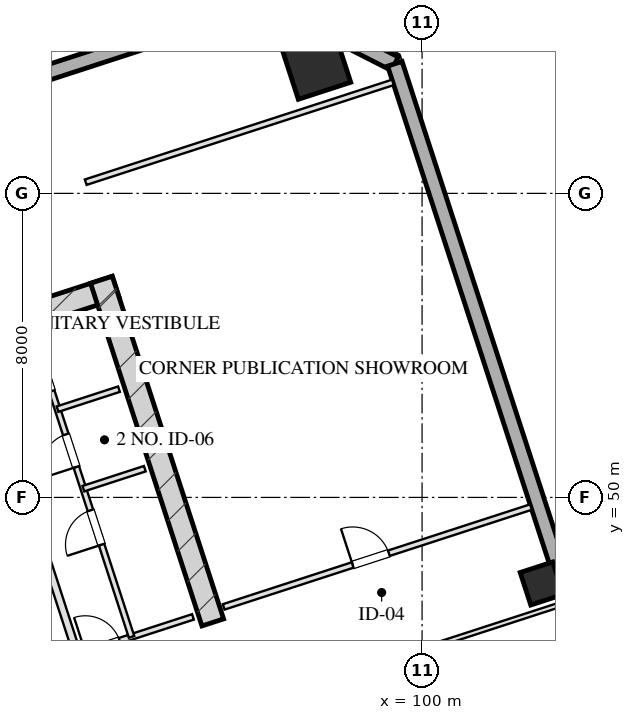
"""IFC4 building model, lengths in metres.
Left out: names, types, materials, properties, quantities, classifications, styles, units other than length and angle.
Written with IfcOpenShell. Run it as: python <this file> out.ifc"""

import sys

from ifc_helpers import new_model, si_unit, direction, frame, frame_2d, origin, origin_2d, place, context, subcontext, project, spatial, rectangle, hollow_rectangle, extrude, element, fill, save


model = new_model("IFC4")
c1 = context("Model", 3, precision=1e-05, world=origin(), true_north=direction((0.0, 1.0)))
c2 = subcontext(c1, "Body", "Model", "MODEL_VIEW")
j1 = project(units=[si_unit("LENGTHUNIT", "METRE"), si_unit("PLANEANGLEUNIT", "RADIAN")], contexts=[c1])
p1 = place(None, origin())
s1 = spatial("IfcSite", under=j1, at=p1, CompositionType="ELEMENT")
p2 = place(p1, origin())
s2 = spatial("IfcBuilding", under=s1, at=p2, CompositionType="ELEMENT")
p3 = place(p2, frame((0.0, 0.0, 117.3)))
s3 = spatial("IfcBuildingStorey", under=s2, at=p3, CompositionType="ELEMENT", Elevation=117.3)
p4 = place(p3, frame((76.344, 50.466, 0.0), z_axis=(0.0, 0.0, 1.0), x_axis=(0.951055727519, 0.309019421968, 0.0)))
e1 = element("IfcWall", 1, at=p4, inside=s3, PredefinedType="SHEAR", context=c2, shape_type="SweptSolid", body=[
    extrude(rectangle(XDim=16.4, YDim=0.6, at=frame_2d((8.2, 0.0))), origin(), (0.0, 0.0, 1.0), 3.45),
])
p5 = place(p3, frame((94.492, 46.71, 0.0), z_axis=(0.0, 0.0, 1.0), x_axis=(-0.309010370028, 0.95105866865, 0.0)))
e2 = element("IfcWall", 2, at=p5, inside=s3, PredefinedType="SHEAR", context=c2, shape_type="SweptSolid", body=[
    extrude(rectangle(XDim=9.48, YDim=0.6, at=frame_2d((4.74, 0.0))), origin(), (0.0, 0.0, 1.0), 3.45),
])
p6 = place(p3, frame((97.209, 61.388, 0.0), z_axis=(0.0, 0.0, 1.0), x_axis=(0.951056516295, 0.309016994375, 0.0)))
e3 = element("IfcColumn", 3, at=p6, inside=s3, PredefinedType="COLUMN", context=c2, shape_type="SweptSolid", body=[
    extrude(hollow_rectangle(XDim=1.45, YDim=1.45, WallThickness=0.05, at=origin_2d()), origin(), (0.0, 0.0, 1.0), 3.451),
])
p7 = place(p3, frame((103.149, 47.736, 0.0), z_axis=(0.0, 0.0, 1.0), x_axis=(0.951056516295, 0.309016994375, 0.0)))
e4 = element("IfcColumn", 4, at=p7, inside=s3, PredefinedType="COLUMN", context=c2, shape_type="SweptSolid", body=[
    extrude(hollow_rectangle(XDim=0.9, YDim=0.9, WallThickness=0.032, at=origin_2d()), origin(), (0.0, 0.0, 1.0), 3.451),
])
p8 = place(p3, frame((68.047, 53.995, 0.0), z_axis=(0.0, 0.0, 1.0), x_axis=(0.95105505922, 0.309021478754, 0.0)))
e5 = element("IfcWall", 5, at=p8, inside=s3, PredefinedType="SOLIDWALL", context=c2, shape_type="SweptSolid", body=[
    extrude(rectangle(XDim=29.4, YDim=0.4, at=frame_2d((14.7, 0.0))), origin(), (0.0, 0.0, 1.0), 2.61),
])
p9 = place(p3, frame((96.008, 63.08, 0.0), z_axis=(0.0, 0.0, 1.0), x_axis=(0.891001999643, -0.45399937955, 0.0)))
e6 = element("IfcWall", 6, at=p9, inside=s3, PredefinedType="SOLIDWALL", context=c2, shape_type="SweptSolid", body=[
    extrude(rectangle(XDim=3.677, YDim=0.4, at=frame_2d((1.839, 0.0))), origin(), (0.0, 0.0, 1.0), 2.61),
])
p10 = place(p3, frame((99.284, 61.41, 0.0), z_axis=(0.0, 0.0, 1.0), x_axis=(0.309017542002, -0.95105633836, 0.0)))
e7 = element("IfcWall", 7, at=p10, inside=s3, PredefinedType="SOLIDWALL", context=c2, shape_type="SweptSolid", body=[
    extrude(rectangle(XDim=46.4, YDim=0.4, at=frame_2d((23.2, 0.0))), origin(), (0.0, 0.0, 1.0), 2.61),
])
p11 = place(p3, frame((90.928, 45.868, 0.0), z_axis=(0.0, 0.0, 1.0), x_axis=(-0.309042196757, 0.951048327176, 0.0)))
e8 = element("IfcWall", 8, at=p11, inside=s3, PredefinedType="PARTITIONING", context=c2, shape_type="SweptSolid", body=[
    extrude(rectangle(XDim=8.43, YDim=0.2, at=frame_2d((4.215, 0.0))), origin(), (0.0, 0.0, 1.0), 3.175),
])
p12 = place(p3, frame((90.928, 45.868, 0.0), z_axis=(0.0, 0.0, 1.0), x_axis=(0.951059297078, 0.309008435874, 0.0)))
e9 = element("IfcWall", 9, at=p12, inside=s3, PredefinedType="PARTITIONING", context=c2, shape_type="SweptSolid", body=[
    extrude(rectangle(XDim=3.2, YDim=0.15, at=frame_2d((1.6, 0.0))), origin(), (0.0, 0.0, 1.0), 3.175),
])
p13 = place(p12, frame((0.22, 0.0, 0.0)))
e10 = element("IfcOpeningElement", 10, at=p13, cuts=e9, PredefinedType="OPENING", context=c2, shape_type="SweptSolid", body=[
    extrude(rectangle(XDim=0.95, YDim=2.05, at=frame_2d((0.475, 1.025))), frame((0.0, 0.085, 0.0), z_axis=(0.0, -1.0, 0.0), x_axis=(1.0, 0.0, 0.0)), (0.0, 0.0, 1.0), 0.17),
])
p14 = place(p3, frame((92.355, 46.331, 0.0), z_axis=(0.0, 0.0, 1.0), x_axis=(-0.309007490203, 0.951059604335, 0.0)))
e11 = element("IfcWall", 11, at=p14, inside=s3, PredefinedType="PARTITIONING", context=c2, shape_type="SweptSolid", body=[
    extrude(rectangle(XDim=8.43, YDim=0.15, at=frame_2d((4.215, 0.0))), origin(), (0.0, 0.0, 1.0), 3.175),
])
p15 = place(p14, frame((2.55, 0.0, 0.0)))
e12 = element("IfcOpeningElement", 12, at=p15, cuts=e11, PredefinedType="OPENING", context=c2, shape_type="SweptSolid", body=[
    extrude(rectangle(XDim=0.95, YDim=2.05, at=frame_2d((0.475, 1.025))), frame((0.0, 0.085, 0.0), z_axis=(0.0, -1.0, 0.0), x_axis=(1.0, 0.0, 0.0)), (0.0, 0.0, 1.0), 0.17),
])
p16 = place(p14, frame((4.7, 0.0, 0.0)))
e13 = element("IfcOpeningElement", 13, at=p16, cuts=e11, PredefinedType="OPENING", context=c2, shape_type="SweptSolid", body=[
    extrude(rectangle(XDim=0.9, YDim=2.05, at=frame_2d((0.45, 1.025))), frame((0.0, 0.085, 0.0), z_axis=(0.0, -1.0, 0.0), x_axis=(1.0, 0.0, 0.0)), (0.0, 0.0, 1.0), 0.17),
])
p17 = place(p14, frame((6.8, 0.0, 0.0)))
e14 = element("IfcOpeningElement", 14, at=p17, cuts=e11, PredefinedType="OPENING", context=c2, shape_type="SweptSolid", body=[
    extrude(rectangle(XDim=0.9, YDim=2.05, at=frame_2d((0.45, 1.025))), frame((0.0, 0.085, 0.0), z_axis=(0.0, -1.0, 0.0), x_axis=(1.0, 0.0, 0.0)), (0.0, 0.0, 1.0), 0.17),
])
p18 = place(p3, frame((91.088, 50.23, 0.0), z_axis=(0.0, 0.0, 1.0), x_axis=(0.951054116971, 0.309024378638, 0.0)))
e15 = element("IfcWall", 15, at=p18, inside=s3, PredefinedType="PARTITIONING", context=c2, shape_type="SweptSolid", body=[
    extrude(rectangle(XDim=1.7, YDim=0.15, at=frame_2d((0.85, 0.0))), origin(), (0.0, 0.0, 1.0), 3.175),
])
p19 = place(p3, frame((90.408, 52.323, 0.0), z_axis=(0.0, 0.0, 1.0), x_axis=(0.951040401051, 0.309066587596, 0.0)))
e16 = element("IfcWall", 16, at=p19, inside=s3, PredefinedType="PARTITIONING", context=c2, shape_type="SweptSolid", body=[
    extrude(rectangle(XDim=1.7, YDim=0.15, at=frame_2d((0.85, 0.0))), origin(), (0.0, 0.0, 1.0), 3.175),
])
p20 = place(p3, frame((91.149, 58.294, 0.0), z_axis=(0.0, 0.0, 1.0), x_axis=(0.951062770994, 0.308997743729, 0.0)))
e17 = element("IfcWall", 17, at=p20, inside=s3, PredefinedType="PARTITIONING", context=c2, shape_type="SweptSolid", body=[
    extrude(rectangle(XDim=8.5, YDim=0.15, at=frame_2d((4.25, 0.0))), origin(), (0.0, 0.0, 1.0), 3.175),
])
p21 = place(p3, frame((94.78, 47.119, 0.0), z_axis=(0.0, 0.0, 1.0), x_axis=(0.951054329824, 0.309023723562, 0.0)))
e18 = element("IfcWall", 18, at=p21, inside=s3, PredefinedType="PARTITIONING", context=c2, shape_type="SweptSolid", body=[
    extrude(rectangle(XDim=8.5, YDim=0.15, at=frame_2d((4.25, 0.0))), origin(), (0.0, 0.0, 1.0), 3.175),
])
p22 = place(p21, frame((3.57, 0.0, 0.0)))
e19 = element("IfcOpeningElement", 19, at=p22, cuts=e18, PredefinedType="OPENING", context=c2, shape_type="SweptSolid", body=[
    extrude(rectangle(XDim=1.0, YDim=2.05, at=frame_2d((0.5, 1.025))), frame((0.0, 0.085, 0.0), z_axis=(0.0, -1.0, 0.0), x_axis=(1.0, 0.0, 0.0)), (0.0, 0.0, 1.0), 0.17),
])
p23 = place(p3, frame((90.853, 43.025, 0.0), z_axis=(0.0, 0.0, 1.0), x_axis=(0.951054001411, 0.309024734286, 0.0)))
e20 = element("IfcWall", 20, at=p23, inside=s3, PredefinedType="PARTITIONING", context=c2, shape_type="SweptSolid", body=[
    extrude(rectangle(XDim=13.5, YDim=0.12, at=frame_2d((6.75, 0.0))), origin(), (0.0, 0.0, 1.0), 3.175),
])
p24 = place(p13, origin())
e21 = element("IfcDoor", 21, at=p24, inside=s3, OperationType="SINGLE_SWING_LEFT", PredefinedType="DOOR", context=c2, shape_type="SweptSolid", body=[
    extrude(rectangle(XDim=0.95, YDim=2.05, at=frame_2d((0.475, 1.025))), frame((0.0, 0.025, 0.0), z_axis=(0.0, -1.0, 0.0), x_axis=(1.0, 0.0, 0.0)), (0.0, 0.0, 1.0), 0.05),
])
fill(e10, e21)
p25 = place(p15, origin())
e22 = element("IfcDoor", 22, at=p25, inside=s3, OperationType="SINGLE_SWING_LEFT", PredefinedType="DOOR", context=c2, shape_type="SweptSolid", body=[
    extrude(rectangle(XDim=0.95, YDim=2.05, at=frame_2d((0.475, 1.025))), frame((0.0, 0.025, 0.0), z_axis=(0.0, -1.0, 0.0), x_axis=(1.0, 0.0, 0.0)), (0.0, 0.0, 1.0), 0.05),
])
fill(e12, e22)
p26 = place(p16, origin())
e23 = element("IfcDoor", 23, at=p26, inside=s3, OperationType="SINGLE_SWING_LEFT", PredefinedType="DOOR", context=c2, shape_type="SweptSolid", body=[
    extrude(rectangle(XDim=0.9, YDim=2.05, at=frame_2d((0.45, 1.025))), frame((0.0, 0.025, 0.0), z_axis=(0.0, -1.0, 0.0), x_axis=(1.0, 0.0, 0.0)), (0.0, 0.0, 1.0), 0.05),
])
fill(e13, e23)
p27 = place(p17, origin())
e24 = element("IfcDoor", 24, at=p27, inside=s3, OperationType="SINGLE_SWING_RIGHT", PredefinedType="DOOR", context=c2, shape_type="SweptSolid", body=[
    extrude(rectangle(XDim=0.9, YDim=2.05, at=frame_2d((0.45, 1.025))), frame((0.0, 0.025, 0.0), z_axis=(0.0, -1.0, 0.0), x_axis=(1.0, 0.0, 0.0)), (0.0, 0.0, 1.0), 0.05),
])
fill(e14, e24)
p28 = place(p22, origin())
e25 = element("IfcDoor", 25, at=p28, inside=s3, OperationType="SINGLE_SWING_LEFT", PredefinedType="DOOR", context=c2, shape_type="SweptSolid", body=[
    extrude(rectangle(XDim=1.0, YDim=2.05, at=frame_2d((0.5, 1.025))), frame((0.0, 0.025, 0.0), z_axis=(0.0, -1.0, 0.0), x_axis=(1.0, 0.0, 0.0)), (0.0, 0.0, 1.0), 0.05),
])
fill(e19, e25)
save(model, sys.argv[1])
